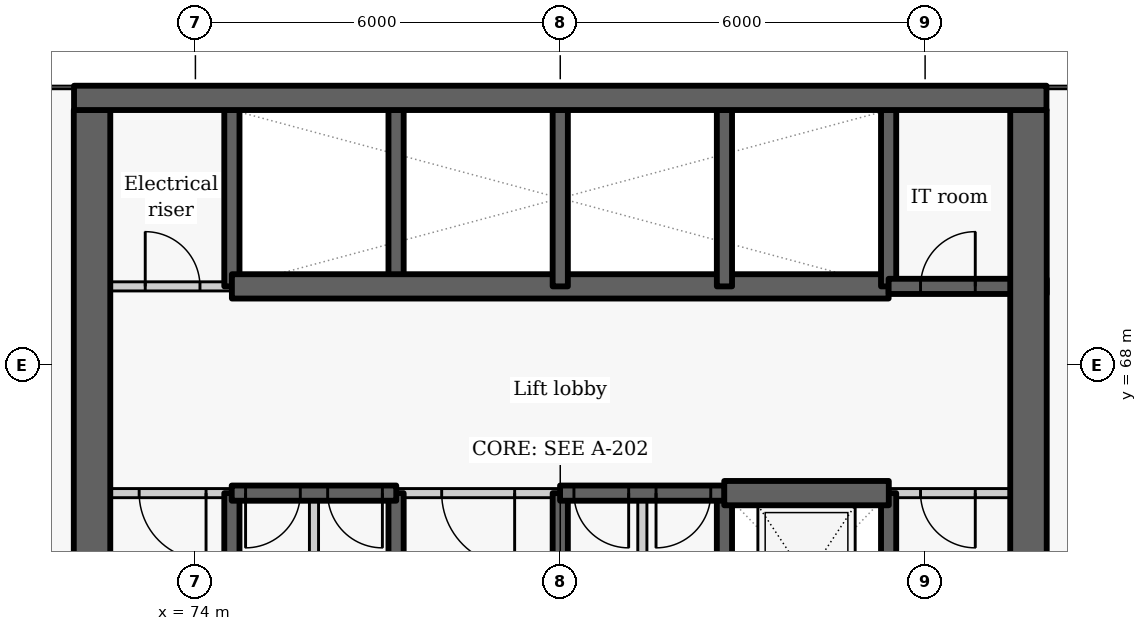
"""IFC4 building model, lengths in metres.
Left out: names, types, materials, properties, quantities, classifications, styles, units other than length and angle.
Written with IfcOpenShell. Run it as: python <this file> out.ifc"""

import sys

from ifc_helpers import new_model, si_unit, direction, frame, frame_2d, origin, place, context, subcontext, project, spatial, rectangle, extrude, element, fill, save


model = new_model("IFC4")
c1 = context("Model", 3, precision=1e-05, world=origin(), true_north=direction((0.0, 1.0)))
c2 = subcontext(c1, "Body", "Model", "MODEL_VIEW")
j1 = project(units=[si_unit("LENGTHUNIT", "METRE"), si_unit("PLANEANGLEUNIT", "RADIAN")], contexts=[c1])
p1 = place(None, origin())
s1 = spatial("IfcSite", under=j1, at=p1, CompositionType="ELEMENT")
p2 = place(p1, origin())
s2 = spatial("IfcBuilding", under=s1, at=p2, CompositionType="ELEMENT")
p3 = place(p2, frame((0.0, 0.0, 6.6)))
s3 = spatial("IfcBuildingStorey", under=s2, at=p3, CompositionType="ELEMENT", Elevation=6.6)
p4 = place(p3, frame((74.6, 63.1, -0.3), z_axis=(0.0, 0.0, 1.0), x_axis=(0.0, 1.0, 0.0)))
e1 = element("IfcWall", 1, at=p4, inside=s3, PredefinedType="SHEAR", context=c2, shape_type="SweptSolid", body=[
    extrude(rectangle(XDim=2.8, YDim=0.25, at=frame_2d((1.4, 0.0))), origin(), (0.0, 0.0, 1.0), 4.8),
])
p5 = place(p3, frame((74.6, 69.3, -0.3), z_axis=(0.0, 0.0, 1.0), x_axis=(0.0, 1.0, 0.0)))
e2 = element("IfcWall", 2, at=p5, inside=s3, PredefinedType="SHEAR", context=c2, shape_type="SweptSolid", body=[
    extrude(rectangle(XDim=2.9, YDim=0.25, at=frame_2d((1.45, 0.0))), origin(), (0.0, 0.0, 1.0), 4.8),
])
p6 = place(p3, frame((72.0, 69.3, 0.0), z_axis=(0.0, 0.0, 1.0), x_axis=(1.0, 0.0, 0.0)))
e3 = element("IfcWall", 3, at=p6, inside=s3, PredefinedType="PARTITIONING", context=c2, shape_type="SweptSolid", body=[
    extrude(rectangle(XDim=2.6, YDim=0.15, at=frame_2d((1.3, 0.0))), origin(), (0.0, 0.0, 1.0), 4.5),
])
p7 = place(p6, frame((1.175, 0.0, 0.0)))
e4 = element("IfcOpeningElement", 4, at=p7, cuts=e3, PredefinedType="OPENING", context=c2, shape_type="SweptSolid", body=[
    extrude(rectangle(XDim=0.9, YDim=2.1, at=frame_2d((0.45, 1.05))), frame((0.0, 0.085, 0.0), z_axis=(0.0, -1.0, 0.0), x_axis=(1.0, 0.0, 0.0)), (0.0, 0.0, 1.0), 0.17),
])
p8 = place(p3, frame((72.3, 63.1, -0.3), z_axis=(0.0, 0.0, 1.0), x_axis=(0.0, 1.0, 0.0)))
e5 = element("IfcWall", 5, at=p8, inside=s3, PredefinedType="SHEAR", context=c2, shape_type="SweptSolid", body=[
    extrude(rectangle(XDim=9.1, YDim=0.6, at=frame_2d((4.55, 0.0))), origin(), (0.0, 0.0, 1.0), 4.8),
])
p9 = place(p3, frame((77.3, 63.1, -0.3), z_axis=(0.0, 0.0, 1.0), x_axis=(0.0, 1.0, 0.0)))
e6 = element("IfcWall", 6, at=p9, inside=s3, PredefinedType="SHEAR", context=c2, shape_type="SweptSolid", body=[
    extrude(rectangle(XDim=2.8, YDim=0.25, at=frame_2d((1.4, 0.0))), origin(), (0.0, 0.0, 1.0), 4.8),
])
p10 = place(p3, frame((77.3, 69.3, -0.3), z_axis=(0.0, 0.0, 1.0), x_axis=(0.0, 1.0, 0.0)))
e7 = element("IfcWall", 7, at=p10, inside=s3, PredefinedType="SHEAR", context=c2, shape_type="SweptSolid", body=[
    extrude(rectangle(XDim=2.9, YDim=0.25, at=frame_2d((1.45, 0.0))), origin(), (0.0, 0.0, 1.0), 4.8),
])
p11 = place(p3, frame((74.6, 69.3, -0.3), z_axis=(0.0, 0.0, 1.0), x_axis=(1.0, 0.0, 0.0)))
e8 = element("IfcWall", 8, at=p11, inside=s3, PredefinedType="SHEAR", context=c2, shape_type="SweptSolid", body=[
    extrude(rectangle(XDim=10.8, YDim=0.4, at=frame_2d((5.4, 0.0))), origin(), (0.0, 0.0, 1.0), 4.8),
])
p12 = place(p3, frame((80.0, 63.1, -0.3), z_axis=(0.0, 0.0, 1.0), x_axis=(0.0, 1.0, 0.0)))
e9 = element("IfcWall", 9, at=p12, inside=s3, PredefinedType="SHEAR", context=c2, shape_type="SweptSolid", body=[
    extrude(rectangle(XDim=2.8, YDim=0.25, at=frame_2d((1.4, 0.0))), origin(), (0.0, 0.0, 1.0), 4.8),
])
p13 = place(p3, frame((80.0, 69.3, -0.3), z_axis=(0.0, 0.0, 1.0), x_axis=(0.0, 1.0, 0.0)))
e10 = element("IfcWall", 10, at=p13, inside=s3, PredefinedType="SHEAR", context=c2, shape_type="SweptSolid", body=[
    extrude(rectangle(XDim=2.9, YDim=0.25, at=frame_2d((1.45, 0.0))), origin(), (0.0, 0.0, 1.0), 4.8),
])
p14 = place(p3, frame((82.7, 63.1, -0.3), z_axis=(0.0, 0.0, 1.0), x_axis=(0.0, 1.0, 0.0)))
e11 = element("IfcWall", 11, at=p14, inside=s3, PredefinedType="SHEAR", context=c2, shape_type="SweptSolid", body=[
    extrude(rectangle(XDim=2.8, YDim=0.25, at=frame_2d((1.4, 0.0))), origin(), (0.0, 0.0, 1.0), 4.8),
])
p15 = place(p3, frame((82.7, 69.3, -0.3), z_axis=(0.0, 0.0, 1.0), x_axis=(0.0, 1.0, 0.0)))
e12 = element("IfcWall", 12, at=p15, inside=s3, PredefinedType="SHEAR", context=c2, shape_type="SweptSolid", body=[
    extrude(rectangle(XDim=2.9, YDim=0.25, at=frame_2d((1.45, 0.0))), origin(), (0.0, 0.0, 1.0), 4.8),
])
p16 = place(p3, frame((85.4, 63.1, -0.3), z_axis=(0.0, 0.0, 1.0), x_axis=(0.0, 1.0, 0.0)))
e13 = element("IfcWall", 13, at=p16, inside=s3, PredefinedType="SHEAR", context=c2, shape_type="SweptSolid", body=[
    extrude(rectangle(XDim=2.8, YDim=0.25, at=frame_2d((1.4, 0.0))), origin(), (0.0, 0.0, 1.0), 4.8),
])
p17 = place(p3, frame((85.4, 69.3, -0.3), z_axis=(0.0, 0.0, 1.0), x_axis=(0.0, 1.0, 0.0)))
e14 = element("IfcWall", 14, at=p17, inside=s3, PredefinedType="SHEAR", context=c2, shape_type="SweptSolid", body=[
    extrude(rectangle(XDim=2.9, YDim=0.25, at=frame_2d((1.45, 0.0))), origin(), (0.0, 0.0, 1.0), 4.8),
])
p18 = place(p3, frame((85.4, 69.3, -0.3), z_axis=(0.0, 0.0, 1.0), x_axis=(1.0, 0.0, 0.0)))
e15 = element("IfcWall", 15, at=p18, inside=s3, PredefinedType="SHEAR", context=c2, shape_type="SweptSolid", body=[
    extrude(rectangle(XDim=2.6, YDim=0.25, at=frame_2d((1.3, 0.0))), origin(), (0.0, 0.0, 1.0), 4.8),
])
p19 = place(p18, frame((0.525, 0.0, 0.3)))
e16 = element("IfcOpeningElement", 16, at=p19, cuts=e15, PredefinedType="OPENING", context=c2, shape_type="SweptSolid", body=[
    extrude(rectangle(XDim=0.9, YDim=2.1, at=frame_2d((0.45, 1.05))), frame((0.0, 0.135, 0.0), z_axis=(0.0, -1.0, 0.0), x_axis=(1.0, 0.0, 0.0)), (0.0, 0.0, 1.0), 0.27),
])
p20 = place(p3, frame((87.7, 72.2, -0.3), z_axis=(0.0, 0.0, 1.0), x_axis=(0.0, -1.0, 0.0)))
e17 = element("IfcWall", 17, at=p20, inside=s3, PredefinedType="SHEAR", context=c2, shape_type="SweptSolid", body=[
    extrude(rectangle(XDim=15.6, YDim=0.6, at=frame_2d((7.8, 0.0))), origin(), (0.0, 0.0, 1.0), 4.8),
])
p21 = place(p20, frame((11.8, 0.0, 0.3)))
e18 = element("IfcOpeningElement", 18, at=p21, cuts=e17, PredefinedType="OPENING", context=c2, shape_type="SweptSolid", body=[
    extrude(rectangle(XDim=1.1, YDim=2.1, at=frame_2d((0.55, 1.05))), frame((0.0, 0.31, 0.0), z_axis=(0.0, -1.0, 0.0), x_axis=(1.0, 0.0, 0.0)), (0.0, 0.0, 1.0), 0.62),
])
p22 = place(p3, frame((74.603, 65.9, 0.0), z_axis=(0.0, 0.0, 1.0), x_axis=(-1.0, 0.0, 0.0)))
e19 = element("IfcWall", 19, at=p22, inside=s3, PredefinedType="PARTITIONING", context=c2, shape_type="SweptSolid", body=[
    extrude(rectangle(XDim=2.603, YDim=0.15, at=frame_2d((1.302, 0.0))), origin(), (0.0, 0.0, 1.0), 4.5),
])
p23 = place(p22, frame((0.428, 0.0, 0.0)))
e20 = element("IfcOpeningElement", 20, at=p23, cuts=e19, PredefinedType="OPENING", context=c2, shape_type="SweptSolid", body=[
    extrude(rectangle(XDim=1.1, YDim=2.1, at=frame_2d((0.55, 1.05))), frame((0.0, 0.085, 0.0), z_axis=(0.0, -1.0, 0.0), x_axis=(1.0, 0.0, 0.0)), (0.0, 0.0, 1.0), 0.17),
])
p24 = place(p3, frame((80.003, 65.9, 0.0), z_axis=(0.0, 0.0, 1.0), x_axis=(-1.0, 0.0, 0.0)))
e21 = element("IfcWall", 21, at=p24, inside=s3, PredefinedType="PARTITIONING", context=c2, shape_type="SweptSolid", body=[
    extrude(rectangle(XDim=2.706, YDim=0.15, at=frame_2d((1.353, 0.0))), origin(), (0.0, 0.0, 1.0), 4.5),
])
p25 = place(p24, frame((0.753, 0.0, 0.0)))
e22 = element("IfcOpeningElement", 22, at=p25, cuts=e21, PredefinedType="OPENING", context=c2, shape_type="SweptSolid", body=[
    extrude(rectangle(XDim=1.2, YDim=2.1, at=frame_2d((0.6, 1.05))), frame((0.0, 0.085, 0.0), z_axis=(0.0, -1.0, 0.0), x_axis=(1.0, 0.0, 0.0)), (0.0, 0.0, 1.0), 0.17),
])
p26 = place(p3, frame((88.0, 65.9, 0.0), z_axis=(0.0, 0.0, 1.0), x_axis=(-1.0, 0.0, 0.0)))
e23 = element("IfcWall", 23, at=p26, inside=s3, PredefinedType="PARTITIONING", context=c2, shape_type="SweptSolid", body=[
    extrude(rectangle(XDim=2.603, YDim=0.15, at=frame_2d((1.302, 0.0))), origin(), (0.0, 0.0, 1.0), 4.5),
])
p27 = place(p26, frame((1.175, 0.0, 0.0)))
e24 = element("IfcOpeningElement", 24, at=p27, cuts=e23, PredefinedType="OPENING", context=c2, shape_type="SweptSolid", body=[
    extrude(rectangle(XDim=0.9, YDim=2.1, at=frame_2d((0.45, 1.05))), frame((0.0, 0.085, 0.0), z_axis=(0.0, -1.0, 0.0), x_axis=(1.0, 0.0, 0.0)), (0.0, 0.0, 1.0), 0.17),
])
p28 = place(p3, frame((77.303, 65.9, -0.3), z_axis=(0.0, 0.0, 1.0), x_axis=(-1.0, 0.0, 0.0)))
e25 = element("IfcWall", 25, at=p28, inside=s3, PredefinedType="SHEAR", context=c2, shape_type="SweptSolid", body=[
    extrude(rectangle(XDim=2.706, YDim=0.25, at=frame_2d((1.353, 0.0))), origin(), (0.0, 0.0, 1.0), 4.8),
])
p29 = place(p28, frame((1.578, 0.0, 0.3)))
e26 = element("IfcOpeningElement", 26, at=p29, cuts=e25, PredefinedType="OPENING", context=c2, shape_type="SweptSolid", body=[
    extrude(rectangle(XDim=0.9, YDim=2.1, at=frame_2d((0.45, 1.05))), frame((0.0, 0.135, 0.0), z_axis=(0.0, -1.0, 0.0), x_axis=(1.0, 0.0, 0.0)), (0.0, 0.0, 1.0), 0.27),
])
p30 = place(p28, frame((0.228, 0.0, 0.3)))
e27 = element("IfcOpeningElement", 27, at=p30, cuts=e25, PredefinedType="OPENING", context=c2, shape_type="SweptSolid", body=[
    extrude(rectangle(XDim=0.9, YDim=2.1, at=frame_2d((0.45, 1.05))), frame((0.0, 0.135, 0.0), z_axis=(0.0, -1.0, 0.0), x_axis=(1.0, 0.0, 0.0)), (0.0, 0.0, 1.0), 0.27),
])
p31 = place(p3, frame((82.703, 65.9, -0.3), z_axis=(0.0, 0.0, 1.0), x_axis=(-1.0, 0.0, 0.0)))
e28 = element("IfcWall", 28, at=p31, inside=s3, PredefinedType="SHEAR", context=c2, shape_type="SweptSolid", body=[
    extrude(rectangle(XDim=2.706, YDim=0.25, at=frame_2d((1.353, 0.0))), origin(), (0.0, 0.0, 1.0), 4.8),
])
p32 = place(p31, frame((1.578, 0.0, 0.3)))
e29 = element("IfcOpeningElement", 29, at=p32, cuts=e28, PredefinedType="OPENING", context=c2, shape_type="SweptSolid", body=[
    extrude(rectangle(XDim=0.9, YDim=2.1, at=frame_2d((0.45, 1.05))), frame((0.0, 0.135, 0.0), z_axis=(0.0, -1.0, 0.0), x_axis=(1.0, 0.0, 0.0)), (0.0, 0.0, 1.0), 0.27),
])
p33 = place(p31, frame((0.228, 0.0, 0.3)))
e30 = element("IfcOpeningElement", 30, at=p33, cuts=e28, PredefinedType="OPENING", context=c2, shape_type="SweptSolid", body=[
    extrude(rectangle(XDim=0.9, YDim=2.1, at=frame_2d((0.45, 1.05))), frame((0.0, 0.135, 0.0), z_axis=(0.0, -1.0, 0.0), x_axis=(1.0, 0.0, 0.0)), (0.0, 0.0, 1.0), 0.27),
])
p34 = place(p3, frame((82.697, 65.9, -0.3), z_axis=(0.0, 0.0, 1.0), x_axis=(1.0, 0.0, 0.0)))
e31 = element("IfcWall", 31, at=p34, inside=s3, PredefinedType="SHEAR", context=c2, shape_type="SweptSolid", body=[
    extrude(rectangle(XDim=2.706, YDim=0.4, at=frame_2d((1.353, 0.0))), origin(), (0.0, 0.0, 1.0), 4.8),
])
for number, where, z_axis, x_axis in (
    (32, (75.95, 63.1, 0.0), (0.0, 0.0, 1.0), (0.0, 1.0, 0.0)),
    (33, (81.35, 63.1, 0.0), (0.0, 0.0, 1.0), (0.0, 1.0, 0.0)),
):
    element("IfcWall", number, at=place(p3, frame(where, z_axis=z_axis, x_axis=x_axis)), inside=s3, PredefinedType="PARTITIONING", context=c2, shape_type="SweptSolid", body=[
        extrude(rectangle(XDim=2.8, YDim=0.15, at=frame_2d((1.4, 0.0))), origin(), (0.0, 0.0, 1.0), 4.5),
    ])
p35 = place(p3, frame((72.004, 72.4, -0.3), z_axis=(0.0, 0.0, 1.0), x_axis=(1.0, 0.0, 0.0)))
e34 = element("IfcWall", 34, at=p35, inside=s3, PredefinedType="SHEAR", context=c2, shape_type="SweptSolid", body=[
    extrude(rectangle(XDim=15.992, YDim=0.4, at=frame_2d((7.996, 0.0))), origin(), (0.0, 0.0, 1.0), 4.8),
])
p36 = place(p7, origin())
e35 = element("IfcDoor", 35, at=p36, inside=s3, OperationType="SINGLE_SWING_LEFT", PredefinedType="DOOR", context=c2, shape_type="SweptSolid", body=[
    extrude(rectangle(XDim=0.9, YDim=2.1, at=frame_2d((0.45, 1.05))), frame((0.0, 0.025, 0.0), z_axis=(0.0, -1.0, 0.0), x_axis=(1.0, 0.0, 0.0)), (0.0, 0.0, 1.0), 0.05),
])
fill(e4, e35)
p37 = place(p19, origin())
e36 = element("IfcDoor", 36, at=p37, inside=s3, OperationType="SINGLE_SWING_RIGHT", PredefinedType="DOOR", context=c2, shape_type="SweptSolid", body=[
    extrude(rectangle(XDim=0.9, YDim=2.1, at=frame_2d((0.45, 1.05))), frame((0.0, 0.025, 0.0), z_axis=(0.0, -1.0, 0.0), x_axis=(1.0, 0.0, 0.0)), (0.0, 0.0, 1.0), 0.05),
])
fill(e16, e36)
p38 = place(p23, origin())
e37 = element("IfcDoor", 37, at=p38, inside=s3, OperationType="SINGLE_SWING_LEFT", PredefinedType="DOOR", context=c2, shape_type="SweptSolid", body=[
    extrude(rectangle(XDim=1.1, YDim=2.1, at=frame_2d((0.55, 1.05))), frame((0.0, 0.025, 0.0), z_axis=(0.0, -1.0, 0.0), x_axis=(1.0, 0.0, 0.0)), (0.0, 0.0, 1.0), 0.05),
])
fill(e20, e37)
p39 = place(p29, origin())
e38 = element("IfcDoor", 38, at=p39, inside=s3, OperationType="SINGLE_SWING_RIGHT", PredefinedType="DOOR", context=c2, shape_type="SweptSolid", body=[
    extrude(rectangle(XDim=0.9, YDim=2.1, at=frame_2d((0.45, 1.05))), frame((0.0, 0.025, 0.0), z_axis=(0.0, -1.0, 0.0), x_axis=(1.0, 0.0, 0.0)), (0.0, 0.0, 1.0), 0.05),
])
fill(e26, e38)
p40 = place(p30, origin())
e39 = element("IfcDoor", 39, at=p40, inside=s3, OperationType="SINGLE_SWING_LEFT", PredefinedType="DOOR", context=c2, shape_type="SweptSolid", body=[
    extrude(rectangle(XDim=0.9, YDim=2.1, at=frame_2d((0.45, 1.05))), frame((0.0, 0.025, 0.0), z_axis=(0.0, -1.0, 0.0), x_axis=(1.0, 0.0, 0.0)), (0.0, 0.0, 1.0), 0.05),
])
fill(e27, e39)
p41 = place(p25, origin())
e40 = element("IfcDoor", 40, at=p41, inside=s3, OperationType="DOUBLE_DOOR_SINGLE_SWING", PredefinedType="DOOR", context=c2, shape_type="SweptSolid", body=[
    extrude(rectangle(XDim=1.2, YDim=2.1, at=frame_2d((0.6, 1.05))), frame((0.0, 0.025, 0.0), z_axis=(0.0, -1.0, 0.0), x_axis=(1.0, 0.0, 0.0)), (0.0, 0.0, 1.0), 0.05),
])
fill(e22, e40)
p42 = place(p32, origin())
e41 = element("IfcDoor", 41, at=p42, inside=s3, OperationType="SINGLE_SWING_LEFT", PredefinedType="DOOR", context=c2, shape_type="SweptSolid", body=[
    extrude(rectangle(XDim=0.9, YDim=2.1, at=frame_2d((0.45, 1.05))), frame((0.0, 0.025, 0.0), z_axis=(0.0, -1.0, 0.0), x_axis=(1.0, 0.0, 0.0)), (0.0, 0.0, 1.0), 0.05),
])
fill(e29, e41)
p43 = place(p33, origin())
e42 = element("IfcDoor", 42, at=p43, inside=s3, OperationType="SINGLE_SWING_RIGHT", PredefinedType="DOOR", context=c2, shape_type="SweptSolid", body=[
    extrude(rectangle(XDim=0.9, YDim=2.1, at=frame_2d((0.45, 1.05))), frame((0.0, 0.025, 0.0), z_axis=(0.0, -1.0, 0.0), x_axis=(1.0, 0.0, 0.0)), (0.0, 0.0, 1.0), 0.05),
])
fill(e30, e42)
p44 = place(p27, origin())
e43 = element("IfcDoor", 43, at=p44, inside=s3, OperationType="SINGLE_SWING_LEFT", PredefinedType="DOOR", context=c2, shape_type="SweptSolid", body=[
    extrude(rectangle(XDim=0.9, YDim=2.1, at=frame_2d((0.45, 1.05))), frame((0.0, 0.025, 0.0), z_axis=(0.0, -1.0, 0.0), x_axis=(1.0, 0.0, 0.0)), (0.0, 0.0, 1.0), 0.05),
])
fill(e24, e43)
save(model, sys.argv[1])
